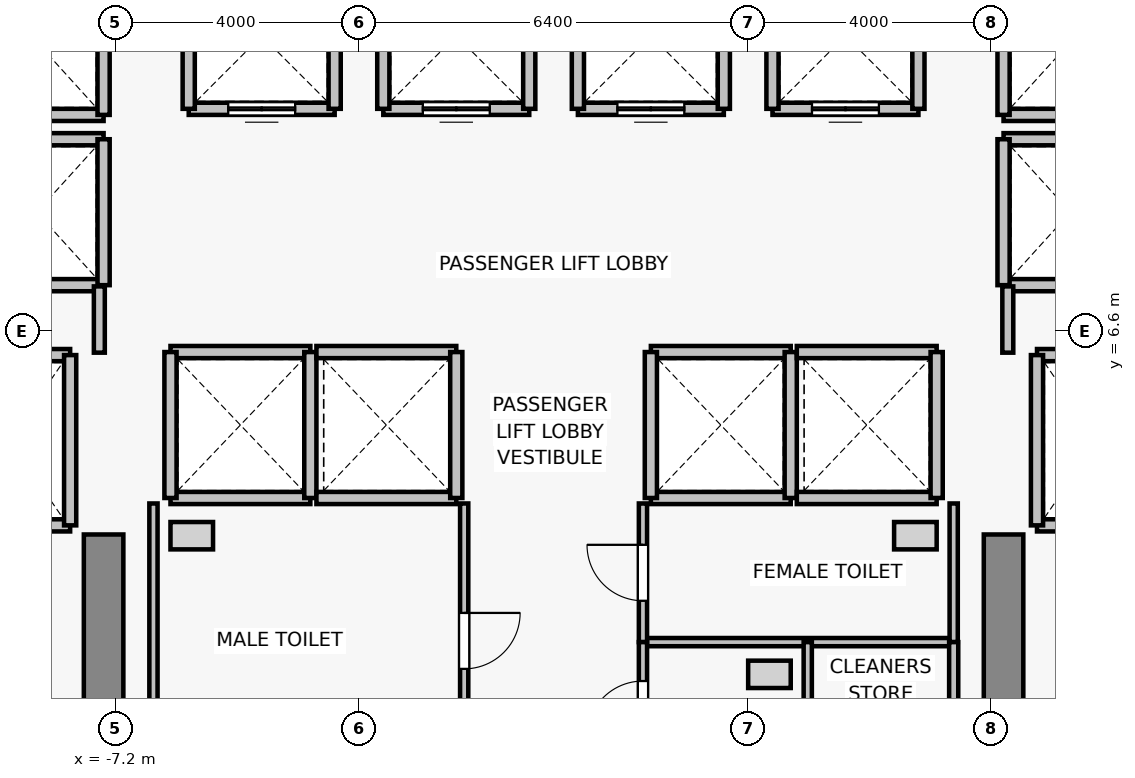
"""IFC4 building model, lengths in metres.
Left out: names, types, materials, properties, quantities, classifications, styles, units other than length and angle.
Written with IfcOpenShell. Run it as: python <this file> out.ifc"""

import sys

from ifc_helpers import new_model, si_unit, direction, frame, frame_2d, origin, place, context, subcontext, project, spatial, rectangle, extrude, source, transform, mapped, element, fill, save


model = new_model("IFC4")
c1 = context("Model", 3, precision=1e-05, world=origin(), true_north=direction((0.0, 1.0)))
c2 = subcontext(c1, "Body", "Model", "MODEL_VIEW")
j1 = project(units=[si_unit("LENGTHUNIT", "METRE"), si_unit("PLANEANGLEUNIT", "RADIAN")], contexts=[c1])
p1 = place(None, origin())
s1 = spatial("IfcSite", under=j1, at=p1, CompositionType="ELEMENT")
p2 = place(p1, origin())
s2 = spatial("IfcBuilding", under=s1, at=p2, CompositionType="ELEMENT")
p3 = place(p2, frame((0.0, 0.0, 40.6)))
s3 = spatial("IfcBuildingStorey", under=s2, at=p3, CompositionType="ELEMENT", Elevation=40.6)
for number, where, z_axis, x_axis in (
    (1, (-7.4, -0.75, 0.0), (0.0, 0.0, 1.0), (0.0, 1.0, 0.0)),
    (2, (7.4, -0.75, 0.0), (0.0, 0.0, 1.0), (0.0, 1.0, 0.0)),
):
    element("IfcWall", number, at=place(p3, frame(where, z_axis=z_axis, x_axis=x_axis)), inside=s3, PredefinedType="SHEAR", context=c2, shape_type="SweptSolid", body=[
        extrude(rectangle(XDim=4.0, YDim=0.65, at=frame_2d((2.0, 0.0))), origin(), (0.0, 0.0, 1.0), 3.075),
    ])
p4 = place(p3, frame((-7.95, 3.4, 0.0), z_axis=(0.0, 0.0, 1.0), x_axis=(-1.0, 0.0, 0.0)))
e3 = element("IfcWall", 3, at=p4, inside=s3, PredefinedType="SOLIDWALL", context=c2, shape_type="SweptSolid", body=[
    extrude(rectangle(XDim=2.0, YDim=0.2, at=frame_2d((1.0, 0.0))), origin(), (0.0, 0.0, 1.0), 3.075),
])
p5 = place(p4, frame((0.45, 0.0, 0.0)))
e4 = element("IfcOpeningElement", 4, at=p5, cuts=e3, PredefinedType="OPENING", context=c2, shape_type="SweptSolid", body=[
    extrude(rectangle(XDim=1.1, YDim=2.2, at=frame_2d((0.55, 1.1))), frame((0.0, 0.11, 0.0), z_axis=(0.0, -1.0, 0.0), x_axis=(1.0, 0.0, 0.0)), (0.0, 0.0, 1.0), 0.22),
])
p6 = place(p3, frame((-9.95, 6.2, 0.0), z_axis=(0.0, 0.0, 1.0), x_axis=(1.0, 0.0, 0.0)))
e5 = element("IfcWall", 5, at=p6, inside=s3, PredefinedType="SOLIDWALL", context=c2, shape_type="SweptSolid", body=[
    extrude(rectangle(XDim=2.0, YDim=0.2, at=frame_2d((1.0, 0.0))), origin(), (0.0, 0.0, 1.0), 3.075),
])
p7 = place(p3, frame((-7.95, 6.2, 0.0), z_axis=(0.0, 0.0, 1.0), x_axis=(0.0, -1.0, 0.0)))
e6 = element("IfcWall", 6, at=p7, inside=s3, PredefinedType="SOLIDWALL", context=c2, shape_type="SweptSolid", body=[
    extrude(rectangle(XDim=2.8, YDim=0.2, at=frame_2d((1.4, 0.0))), origin(), (0.0, 0.0, 1.0), 3.075),
])
p8 = place(p3, frame((9.95, 3.4, 0.0), z_axis=(0.0, 0.0, 1.0), x_axis=(-1.0, 0.0, 0.0)))
e7 = element("IfcWall", 7, at=p8, inside=s3, PredefinedType="SOLIDWALL", context=c2, shape_type="SweptSolid", body=[
    extrude(rectangle(XDim=2.0, YDim=0.2, at=frame_2d((1.0, 0.0))), origin(), (0.0, 0.0, 1.0), 3.075),
])
p9 = place(p8, frame((0.45, 0.0, 0.0)))
e8 = element("IfcOpeningElement", 8, at=p9, cuts=e7, PredefinedType="OPENING", context=c2, shape_type="SweptSolid", body=[
    extrude(rectangle(XDim=1.1, YDim=2.2, at=frame_2d((0.55, 1.1))), frame((0.0, 0.11, 0.0), z_axis=(0.0, -1.0, 0.0), x_axis=(1.0, 0.0, 0.0)), (0.0, 0.0, 1.0), 0.22),
])
p10 = place(p3, frame((7.95, 6.2, 0.0), z_axis=(0.0, 0.0, 1.0), x_axis=(1.0, 0.0, 0.0)))
e9 = element("IfcWall", 9, at=p10, inside=s3, PredefinedType="SOLIDWALL", context=c2, shape_type="SweptSolid", body=[
    extrude(rectangle(XDim=2.0, YDim=0.2, at=frame_2d((1.0, 0.0))), origin(), (0.0, 0.0, 1.0), 3.075),
])
p11 = place(p3, frame((7.95, 3.4, 0.0), z_axis=(0.0, 0.0, 1.0), x_axis=(0.0, 1.0, 0.0)))
e10 = element("IfcWall", 10, at=p11, inside=s3, PredefinedType="SOLIDWALL", context=c2, shape_type="SweptSolid", body=[
    extrude(rectangle(XDim=2.8, YDim=0.2, at=frame_2d((1.4, 0.0))), origin(), (0.0, 0.0, 1.0), 3.075),
])
p12 = place(p3, frame((-3.6, 10.25, 0.0), z_axis=(0.0, 0.0, 1.0), x_axis=(-1.0, 0.0, 0.0)))
e11 = element("IfcWall", 11, at=p12, inside=s3, PredefinedType="SOLIDWALL", context=c2, shape_type="SweptSolid", body=[
    extrude(rectangle(XDim=2.4, YDim=0.2, at=frame_2d((1.2, 0.0))), origin(), (0.0, 0.0, 1.0), 3.075),
])
p13 = place(p12, frame((0.65, 0.0, 0.0)))
e12 = element("IfcOpeningElement", 12, at=p13, cuts=e11, PredefinedType="OPENING", context=c2, shape_type="SweptSolid", body=[
    extrude(rectangle(XDim=1.1, YDim=2.2, at=frame_2d((0.55, 1.1))), frame((0.0, 0.11, 0.0), z_axis=(0.0, -1.0, 0.0), x_axis=(1.0, 0.0, 0.0)), (0.0, 0.0, 1.0), 0.22),
])
for number, where, z_axis, x_axis in (
    (13, (-6.0, 10.25, 0.0), (0.0, 0.0, 1.0), (0.0, 1.0, 0.0)),
    (14, (-3.6, 12.65, 0.0), (0.0, 0.0, 1.0), (0.0, -1.0, 0.0)),
):
    element("IfcWall", number, at=place(p3, frame(where, z_axis=z_axis, x_axis=x_axis)), inside=s3, PredefinedType="SOLIDWALL", context=c2, shape_type="SweptSolid", body=[
        extrude(rectangle(XDim=2.4, YDim=0.2, at=frame_2d((1.2, 0.0))), origin(), (0.0, 0.0, 1.0), 3.075),
    ])
p14 = place(p3, frame((-0.4, 10.25, 0.0), z_axis=(0.0, 0.0, 1.0), x_axis=(-1.0, 0.0, 0.0)))
e15 = element("IfcWall", 15, at=p14, inside=s3, PredefinedType="SOLIDWALL", context=c2, shape_type="SweptSolid", body=[
    extrude(rectangle(XDim=2.4, YDim=0.2, at=frame_2d((1.2, 0.0))), origin(), (0.0, 0.0, 1.0), 3.075),
])
p15 = place(p14, frame((0.65, 0.0, 0.0)))
e16 = element("IfcOpeningElement", 16, at=p15, cuts=e15, PredefinedType="OPENING", context=c2, shape_type="SweptSolid", body=[
    extrude(rectangle(XDim=1.1, YDim=2.2, at=frame_2d((0.55, 1.1))), frame((0.0, 0.11, 0.0), z_axis=(0.0, -1.0, 0.0), x_axis=(1.0, 0.0, 0.0)), (0.0, 0.0, 1.0), 0.22),
])
for number, where, z_axis, x_axis in (
    (17, (-2.8, 10.25, 0.0), (0.0, 0.0, 1.0), (0.0, 1.0, 0.0)),
    (18, (-0.4, 12.65, 0.0), (0.0, 0.0, 1.0), (0.0, -1.0, 0.0)),
):
    element("IfcWall", number, at=place(p3, frame(where, z_axis=z_axis, x_axis=x_axis)), inside=s3, PredefinedType="SOLIDWALL", context=c2, shape_type="SweptSolid", body=[
        extrude(rectangle(XDim=2.4, YDim=0.2, at=frame_2d((1.2, 0.0))), origin(), (0.0, 0.0, 1.0), 3.075),
    ])
p16 = place(p3, frame((2.8, 10.25, 0.0), z_axis=(0.0, 0.0, 1.0), x_axis=(-1.0, 0.0, 0.0)))
e19 = element("IfcWall", 19, at=p16, inside=s3, PredefinedType="SOLIDWALL", context=c2, shape_type="SweptSolid", body=[
    extrude(rectangle(XDim=2.4, YDim=0.2, at=frame_2d((1.2, 0.0))), origin(), (0.0, 0.0, 1.0), 3.075),
])
p17 = place(p16, frame((0.65, 0.0, 0.0)))
e20 = element("IfcOpeningElement", 20, at=p17, cuts=e19, PredefinedType="OPENING", context=c2, shape_type="SweptSolid", body=[
    extrude(rectangle(XDim=1.1, YDim=2.2, at=frame_2d((0.55, 1.1))), frame((0.0, 0.11, 0.0), z_axis=(0.0, -1.0, 0.0), x_axis=(1.0, 0.0, 0.0)), (0.0, 0.0, 1.0), 0.22),
])
for number, where, z_axis, x_axis in (
    (21, (0.4, 10.25, 0.0), (0.0, 0.0, 1.0), (0.0, 1.0, 0.0)),
    (22, (2.8, 12.65, 0.0), (0.0, 0.0, 1.0), (0.0, -1.0, 0.0)),
):
    element("IfcWall", number, at=place(p3, frame(where, z_axis=z_axis, x_axis=x_axis)), inside=s3, PredefinedType="SOLIDWALL", context=c2, shape_type="SweptSolid", body=[
        extrude(rectangle(XDim=2.4, YDim=0.2, at=frame_2d((1.2, 0.0))), origin(), (0.0, 0.0, 1.0), 3.075),
    ])
p18 = place(p3, frame((6.0, 10.25, 0.0), z_axis=(0.0, 0.0, 1.0), x_axis=(-1.0, 0.0, 0.0)))
e23 = element("IfcWall", 23, at=p18, inside=s3, PredefinedType="SOLIDWALL", context=c2, shape_type="SweptSolid", body=[
    extrude(rectangle(XDim=2.4, YDim=0.2, at=frame_2d((1.2, 0.0))), origin(), (0.0, 0.0, 1.0), 3.075),
])
p19 = place(p18, frame((0.65, 0.0, 0.0)))
e24 = element("IfcOpeningElement", 24, at=p19, cuts=e23, PredefinedType="OPENING", context=c2, shape_type="SweptSolid", body=[
    extrude(rectangle(XDim=1.1, YDim=2.2, at=frame_2d((0.55, 1.1))), frame((0.0, 0.11, 0.0), z_axis=(0.0, -1.0, 0.0), x_axis=(1.0, 0.0, 0.0)), (0.0, 0.0, 1.0), 0.22),
])
for number, where, z_axis, x_axis in (
    (25, (3.6, 10.25, 0.0), (0.0, 0.0, 1.0), (0.0, 1.0, 0.0)),
    (26, (6.0, 12.65, 0.0), (0.0, 0.0, 1.0), (0.0, -1.0, 0.0)),
):
    element("IfcWall", number, at=place(p3, frame(where, z_axis=z_axis, x_axis=x_axis)), inside=s3, PredefinedType="SOLIDWALL", context=c2, shape_type="SweptSolid", body=[
        extrude(rectangle(XDim=2.4, YDim=0.2, at=frame_2d((1.2, 0.0))), origin(), (0.0, 0.0, 1.0), 3.075),
    ])
for number, where, z_axis, x_axis in (
    (27, (-4.0, 3.85, 0.0), (0.0, 0.0, 1.0), (-1.0, 0.0, 0.0)),
    (28, (-6.3, 6.25, 0.0), (0.0, 0.0, 1.0), (1.0, 0.0, 0.0)),
):
    element("IfcWall", number, at=place(p3, frame(where, z_axis=z_axis, x_axis=x_axis)), inside=s3, PredefinedType="SOLIDWALL", context=c2, shape_type="SweptSolid", body=[
        extrude(rectangle(XDim=2.3, YDim=0.2, at=frame_2d((1.15, 0.0))), origin(), (0.0, 0.0, 1.0), 3.075),
    ])
for number, where, z_axis, x_axis in (
    (29, (-6.3, 3.85, 0.0), (0.0, 0.0, 1.0), (0.0, 1.0, 0.0)),
    (30, (-4.0, 6.25, 0.0), (0.0, 0.0, 1.0), (0.0, -1.0, 0.0)),
):
    element("IfcWall", number, at=place(p3, frame(where, z_axis=z_axis, x_axis=x_axis)), inside=s3, PredefinedType="SOLIDWALL", context=c2, shape_type="SweptSolid", body=[
        extrude(rectangle(XDim=2.4, YDim=0.2, at=frame_2d((1.2, 0.0))), origin(), (0.0, 0.0, 1.0), 3.075),
    ])
for number, where, z_axis, x_axis in (
    (31, (-1.6, 3.85, 0.0), (0.0, 0.0, 1.0), (-1.0, 0.0, 0.0)),
    (32, (-3.9, 6.25, 0.0), (0.0, 0.0, 1.0), (1.0, 0.0, 0.0)),
):
    element("IfcWall", number, at=place(p3, frame(where, z_axis=z_axis, x_axis=x_axis)), inside=s3, PredefinedType="SOLIDWALL", context=c2, shape_type="SweptSolid", body=[
        extrude(rectangle(XDim=2.3, YDim=0.2, at=frame_2d((1.15, 0.0))), origin(), (0.0, 0.0, 1.0), 3.075),
    ])
p20 = place(p3, frame((-1.6, 6.25, 0.0), z_axis=(0.0, 0.0, 1.0), x_axis=(0.0, -1.0, 0.0)))
e33 = element("IfcWall", 33, at=p20, inside=s3, PredefinedType="SOLIDWALL", context=c2, shape_type="SweptSolid", body=[
    extrude(rectangle(XDim=2.4, YDim=0.2, at=frame_2d((1.2, 0.0))), origin(), (0.0, 0.0, 1.0), 3.075),
])
for number, where, z_axis, x_axis in (
    (34, (3.9, 3.85, 0.0), (0.0, 0.0, 1.0), (-1.0, 0.0, 0.0)),
    (35, (1.6, 6.25, 0.0), (0.0, 0.0, 1.0), (1.0, 0.0, 0.0)),
):
    element("IfcWall", number, at=place(p3, frame(where, z_axis=z_axis, x_axis=x_axis)), inside=s3, PredefinedType="SOLIDWALL", context=c2, shape_type="SweptSolid", body=[
        extrude(rectangle(XDim=2.3, YDim=0.2, at=frame_2d((1.15, 0.0))), origin(), (0.0, 0.0, 1.0), 3.075),
    ])
for number, where, z_axis, x_axis in (
    (36, (1.6, 3.85, 0.0), (0.0, 0.0, 1.0), (0.0, 1.0, 0.0)),
    (37, (3.9, 6.25, 0.0), (0.0, 0.0, 1.0), (0.0, -1.0, 0.0)),
):
    element("IfcWall", number, at=place(p3, frame(where, z_axis=z_axis, x_axis=x_axis)), inside=s3, PredefinedType="SOLIDWALL", context=c2, shape_type="SweptSolid", body=[
        extrude(rectangle(XDim=2.4, YDim=0.2, at=frame_2d((1.2, 0.0))), origin(), (0.0, 0.0, 1.0), 3.075),
    ])
for number, where, z_axis, x_axis in (
    (38, (6.3, 3.85, 0.0), (0.0, 0.0, 1.0), (-1.0, 0.0, 0.0)),
    (39, (4.0, 6.25, 0.0), (0.0, 0.0, 1.0), (1.0, 0.0, 0.0)),
):
    element("IfcWall", number, at=place(p3, frame(where, z_axis=z_axis, x_axis=x_axis)), inside=s3, PredefinedType="SOLIDWALL", context=c2, shape_type="SweptSolid", body=[
        extrude(rectangle(XDim=2.3, YDim=0.2, at=frame_2d((1.15, 0.0))), origin(), (0.0, 0.0, 1.0), 3.075),
    ])
p21 = place(p3, frame((6.3, 6.25, 0.0), z_axis=(0.0, 0.0, 1.0), x_axis=(0.0, -1.0, 0.0)))
e40 = element("IfcWall", 40, at=p21, inside=s3, PredefinedType="SOLIDWALL", context=c2, shape_type="SweptSolid", body=[
    extrude(rectangle(XDim=2.4, YDim=0.2, at=frame_2d((1.2, 0.0))), origin(), (0.0, 0.0, 1.0), 3.075),
])
for number, where, z_axis, x_axis in (
    (41, (-7.4, 7.35, 0.0), (0.0, 0.0, 1.0), (-1.0, 0.0, 0.0)),
    (42, (-9.6, 9.75, 0.0), (0.0, 0.0, 1.0), (1.0, 0.0, 0.0)),
):
    element("IfcWall", number, at=place(p3, frame(where, z_axis=z_axis, x_axis=x_axis)), inside=s3, PredefinedType="SOLIDWALL", context=c2, shape_type="SweptSolid", body=[
        extrude(rectangle(XDim=2.2, YDim=0.2, at=frame_2d((1.1, 0.0))), origin(), (0.0, 0.0, 1.0), 2.465),
    ])
p22 = place(p3, frame((-7.4, 9.75, 0.0), z_axis=(0.0, 0.0, 1.0), x_axis=(0.0, -1.0, 0.0)))
e43 = element("IfcWall", 43, at=p22, inside=s3, PredefinedType="SOLIDWALL", context=c2, shape_type="SweptSolid", body=[
    extrude(rectangle(XDim=2.4, YDim=0.2, at=frame_2d((1.2, 0.0))), origin(), (0.0, 0.0, 1.0), 2.465),
])
p23 = place(p3, frame((-7.4, 10.15, 0.0), z_axis=(0.0, 0.0, 1.0), x_axis=(-1.0, 0.0, 0.0)))
e44 = element("IfcWall", 44, at=p23, inside=s3, PredefinedType="SOLIDWALL", context=c2, shape_type="SweptSolid", body=[
    extrude(rectangle(XDim=2.2, YDim=0.2, at=frame_2d((1.1, 0.0))), origin(), (0.0, 0.0, 1.0), 2.465),
])
p24 = place(p3, frame((-7.4, 12.55, 0.0), z_axis=(0.0, 0.0, 1.0), x_axis=(0.0, -1.0, 0.0)))
e45 = element("IfcWall", 45, at=p24, inside=s3, PredefinedType="SOLIDWALL", context=c2, shape_type="SweptSolid", body=[
    extrude(rectangle(XDim=2.4, YDim=0.2, at=frame_2d((1.2, 0.0))), origin(), (0.0, 0.0, 1.0), 2.465),
])
for number, where, z_axis, x_axis in (
    (46, (9.6, 7.35, 0.0), (0.0, 0.0, 1.0), (-1.0, 0.0, 0.0)),
    (47, (7.4, 9.75, 0.0), (0.0, 0.0, 1.0), (1.0, 0.0, 0.0)),
):
    element("IfcWall", number, at=place(p3, frame(where, z_axis=z_axis, x_axis=x_axis)), inside=s3, PredefinedType="SOLIDWALL", context=c2, shape_type="SweptSolid", body=[
        extrude(rectangle(XDim=2.2, YDim=0.2, at=frame_2d((1.1, 0.0))), origin(), (0.0, 0.0, 1.0), 2.465),
    ])
p25 = place(p3, frame((7.4, 7.35, 0.0), z_axis=(0.0, 0.0, 1.0), x_axis=(0.0, 1.0, 0.0)))
e48 = element("IfcWall", 48, at=p25, inside=s3, PredefinedType="SOLIDWALL", context=c2, shape_type="SweptSolid", body=[
    extrude(rectangle(XDim=2.4, YDim=0.2, at=frame_2d((1.2, 0.0))), origin(), (0.0, 0.0, 1.0), 2.465),
])
p26 = place(p3, frame((9.6, 10.15, 0.0), z_axis=(0.0, 0.0, 1.0), x_axis=(-1.0, 0.0, 0.0)))
e49 = element("IfcWall", 49, at=p26, inside=s3, PredefinedType="SOLIDWALL", context=c2, shape_type="SweptSolid", body=[
    extrude(rectangle(XDim=2.2, YDim=0.2, at=frame_2d((1.1, 0.0))), origin(), (0.0, 0.0, 1.0), 2.465),
])
p27 = place(p3, frame((7.4, 10.15, 0.0), z_axis=(0.0, 0.0, 1.0), x_axis=(0.0, 1.0, 0.0)))
e50 = element("IfcWall", 50, at=p27, inside=s3, PredefinedType="SOLIDWALL", context=c2, shape_type="SweptSolid", body=[
    extrude(rectangle(XDim=2.4, YDim=0.2, at=frame_2d((1.2, 0.0))), origin(), (0.0, 0.0, 1.0), 2.465),
])
for number, where, z_axis, x_axis in (
    (51, (-7.47, 7.33, 0.0), (0.0, 0.0, 1.0), (0.0, -1.0, 0.0)),
    (52, (7.47, 6.24, 0.0), (0.0, 0.0, 1.0), (0.0, 1.0, 0.0)),
):
    element("IfcWall", number, at=place(p3, frame(where, z_axis=z_axis, x_axis=x_axis)), inside=s3, PredefinedType="PARTITIONING", context=c2, shape_type="SweptSolid", body=[
        extrude(rectangle(XDim=1.09, YDim=0.18, at=frame_2d((0.545, 0.0))), origin(), (0.0, 0.0, 1.0), 2.465),
    ])
p28 = place(p3, frame((-6.58, -0.73, 0.0), z_axis=(0.0, 0.0, 1.0), x_axis=(0.0, 1.0, 0.0)))
e53 = element("IfcWall", 53, at=p28, inside=s3, PredefinedType="PARTITIONING", context=c2, shape_type="SweptSolid", body=[
    extrude(rectangle(XDim=4.49, YDim=0.135, at=frame_2d((2.245, 0.0))), origin(), (0.0, 0.0, 1.0), 3.075),
])
p29 = place(p3, frame((-1.47, 3.76, 0.0), z_axis=(0.0, 0.0, 1.0), x_axis=(0.0, -1.0, 0.0)))
e54 = element("IfcWall", 54, at=p29, inside=s3, PredefinedType="PARTITIONING", context=c2, shape_type="SweptSolid", body=[
    extrude(rectangle(XDim=4.49, YDim=0.135, at=frame_2d((2.245, 0.0))), origin(), (0.0, 0.0, 1.0), 3.075),
])
p30 = place(p29, frame((1.8, 0.0, 0.0)))
e55 = element("IfcOpeningElement", 55, at=p30, cuts=e54, PredefinedType="OPENING", context=c2, shape_type="SweptSolid", body=[
    extrude(rectangle(XDim=0.92, YDim=2.1, at=frame_2d((0.46, 1.05))), frame((0.0, 0.077, 0.0), z_axis=(0.0, -1.0, 0.0), x_axis=(1.0, 0.0, 0.0)), (0.0, 0.0, 1.0), 0.155),
])
p31 = place(p3, frame((6.58, 1.48, 0.0), z_axis=(0.0, 0.0, 1.0), x_axis=(-1.0, 0.0, 0.0)))
e56 = element("IfcWall", 56, at=p31, inside=s3, PredefinedType="PARTITIONING", context=c2, shape_type="SweptSolid", body=[
    extrude(rectangle(XDim=5.11, YDim=0.135, at=frame_2d((2.555, 0.0))), origin(), (0.0, 0.0, 1.0), 3.075),
])
p32 = place(p3, frame((1.47, 1.48, 0.0), z_axis=(0.0, 0.0, 1.0), x_axis=(0.0, 1.0, 0.0)))
e57 = element("IfcWall", 57, at=p32, inside=s3, PredefinedType="PARTITIONING", context=c2, shape_type="SweptSolid", body=[
    extrude(rectangle(XDim=2.28, YDim=0.135, at=frame_2d((1.14, 0.0))), origin(), (0.0, 0.0, 1.0), 3.075),
])
p33 = place(p32, frame((0.68, 0.0, 0.0)))
e58 = element("IfcOpeningElement", 58, at=p33, cuts=e57, PredefinedType="OPENING", context=c2, shape_type="SweptSolid", body=[
    extrude(rectangle(XDim=0.92, YDim=2.1, at=frame_2d((0.46, 1.05))), frame((0.0, 0.077, 0.0), z_axis=(0.0, -1.0, 0.0), x_axis=(1.0, 0.0, 0.0)), (0.0, 0.0, 1.0), 0.155),
])
p34 = place(p3, frame((6.58, 3.76, 0.0), z_axis=(0.0, 0.0, 1.0), x_axis=(0.0, -1.0, 0.0)))
e59 = element("IfcWall", 59, at=p34, inside=s3, PredefinedType="PARTITIONING", context=c2, shape_type="SweptSolid", body=[
    extrude(rectangle(XDim=2.28, YDim=0.135, at=frame_2d((1.14, 0.0))), origin(), (0.0, 0.0, 1.0), 3.075),
])
p35 = place(p3, frame((1.47, -0.73, 0.0), z_axis=(0.0, 0.0, 1.0), x_axis=(0.0, 1.0, 0.0)))
e60 = element("IfcWall", 60, at=p35, inside=s3, PredefinedType="PARTITIONING", context=c2, shape_type="SweptSolid", body=[
    extrude(rectangle(XDim=2.21, YDim=0.135, at=frame_2d((1.105, 0.0))), origin(), (0.0, 0.0, 1.0), 3.075),
])
p36 = place(p35, frame((0.65, 0.0, 0.0)))
e61 = element("IfcOpeningElement", 61, at=p36, cuts=e60, PredefinedType="OPENING", context=c2, shape_type="SweptSolid", body=[
    extrude(rectangle(XDim=0.92, YDim=2.1, at=frame_2d((0.46, 1.05))), frame((0.0, 0.077, 0.0), z_axis=(0.0, -1.0, 0.0), x_axis=(1.0, 0.0, 0.0)), (0.0, 0.0, 1.0), 0.155),
])
p37 = place(p3, frame((4.18, 1.48, 0.0), z_axis=(0.0, 0.0, 1.0), x_axis=(0.0, -1.0, 0.0)))
e62 = element("IfcWall", 62, at=p37, inside=s3, PredefinedType="PARTITIONING", context=c2, shape_type="SweptSolid", body=[
    extrude(rectangle(XDim=2.21, YDim=0.135, at=frame_2d((1.105, 0.0))), origin(), (0.0, 0.0, 1.0), 3.075),
])
p38 = place(p3, frame((6.58, 1.48, 0.0), z_axis=(0.0, 0.0, 1.0), x_axis=(0.0, -1.0, 0.0)))
e63 = element("IfcWall", 63, at=p38, inside=s3, PredefinedType="PARTITIONING", context=c2, shape_type="SweptSolid", body=[
    extrude(rectangle(XDim=2.21, YDim=0.15, at=frame_2d((1.105, 0.0))), origin(), (0.0, 0.0, 1.0), 3.075),
])
m1 = source(origin(), c2, "Body", "SweptSolid", [
    extrude(rectangle(XDim=1.1, YDim=2.2, at=frame_2d((0.55, 1.1))), frame((0.0, 0.025, 0.0), z_axis=(0.0, -1.0, 0.0), x_axis=(1.0, 0.0, 0.0)), (0.0, 0.0, 1.0), 0.05),
])
p39 = place(p13, origin())
e64 = element("IfcDoor", 64, at=p39, inside=s3, OperationType="DOUBLE_DOOR_SLIDING", PredefinedType="DOOR", context=c2, shape_type="MappedRepresentation", body=[
    mapped(m1, transform((0.0, 0.0, 0.0), x_axis=(1.0, 0.0, 0.0), y_axis=(0.0, 1.0, 0.0), z_axis=(0.0, 0.0, 1.0), scale=1.0)),
])
fill(e12, e64)
p40 = place(p15, origin())
e65 = element("IfcDoor", 65, at=p40, inside=s3, OperationType="DOUBLE_DOOR_SLIDING", PredefinedType="DOOR", context=c2, shape_type="MappedRepresentation", body=[
    mapped(m1, transform((0.0, 0.0, 0.0), x_axis=(1.0, 0.0, 0.0), y_axis=(0.0, 1.0, 0.0), z_axis=(0.0, 0.0, 1.0), scale=1.0)),
])
fill(e16, e65)
p41 = place(p17, origin())
e66 = element("IfcDoor", 66, at=p41, inside=s3, OperationType="DOUBLE_DOOR_SLIDING", PredefinedType="DOOR", context=c2, shape_type="MappedRepresentation", body=[
    mapped(m1, transform((0.0, 0.0, 0.0), x_axis=(1.0, 0.0, 0.0), y_axis=(0.0, 1.0, 0.0), z_axis=(0.0, 0.0, 1.0), scale=1.0)),
])
fill(e20, e66)
p42 = place(p19, origin())
e67 = element("IfcDoor", 67, at=p42, inside=s3, OperationType="DOUBLE_DOOR_SLIDING", PredefinedType="DOOR", context=c2, shape_type="MappedRepresentation", body=[
    mapped(m1, transform((0.0, 0.0, 0.0), x_axis=(1.0, 0.0, 0.0), y_axis=(0.0, 1.0, 0.0), z_axis=(0.0, 0.0, 1.0), scale=1.0)),
])
fill(e24, e67)
m2 = source(origin(), c2, "Body", "SweptSolid", [
    extrude(rectangle(XDim=0.92, YDim=2.1, at=frame_2d((0.46, 1.05))), frame((0.0, 0.025, 0.0), z_axis=(0.0, -1.0, 0.0), x_axis=(1.0, 0.0, 0.0)), (0.0, 0.0, 1.0), 0.05),
])
p43 = place(p30, origin())
e68 = element("IfcDoor", 68, at=p43, inside=s3, OperationType="SINGLE_SWING_LEFT", PredefinedType="DOOR", context=c2, shape_type="MappedRepresentation", body=[
    mapped(m2, transform((0.0, 0.0, 0.0), x_axis=(1.0, 0.0, 0.0), y_axis=(0.0, 1.0, 0.0), z_axis=(0.0, 0.0, 1.0), scale=1.0)),
])
fill(e55, e68)
p44 = place(p33, origin())
e69 = element("IfcDoor", 69, at=p44, inside=s3, OperationType="SINGLE_SWING_RIGHT", PredefinedType="DOOR", context=c2, shape_type="MappedRepresentation", body=[
    mapped(m2, transform((0.0, 0.0, 0.0), x_axis=(1.0, 0.0, 0.0), y_axis=(0.0, 1.0, 0.0), z_axis=(0.0, 0.0, 1.0), scale=1.0)),
])
fill(e58, e69)
p45 = place(p36, origin())
e70 = element("IfcDoor", 70, at=p45, inside=s3, OperationType="SINGLE_SWING_LEFT", PredefinedType="DOOR", context=c2, shape_type="MappedRepresentation", body=[
    mapped(m2, transform((0.0, 0.0, 0.0), x_axis=(1.0, 0.0, 0.0), y_axis=(0.0, 1.0, 0.0), z_axis=(0.0, 0.0, 1.0), scale=1.0)),
])
fill(e61, e70)
save(model, sys.argv[1])
